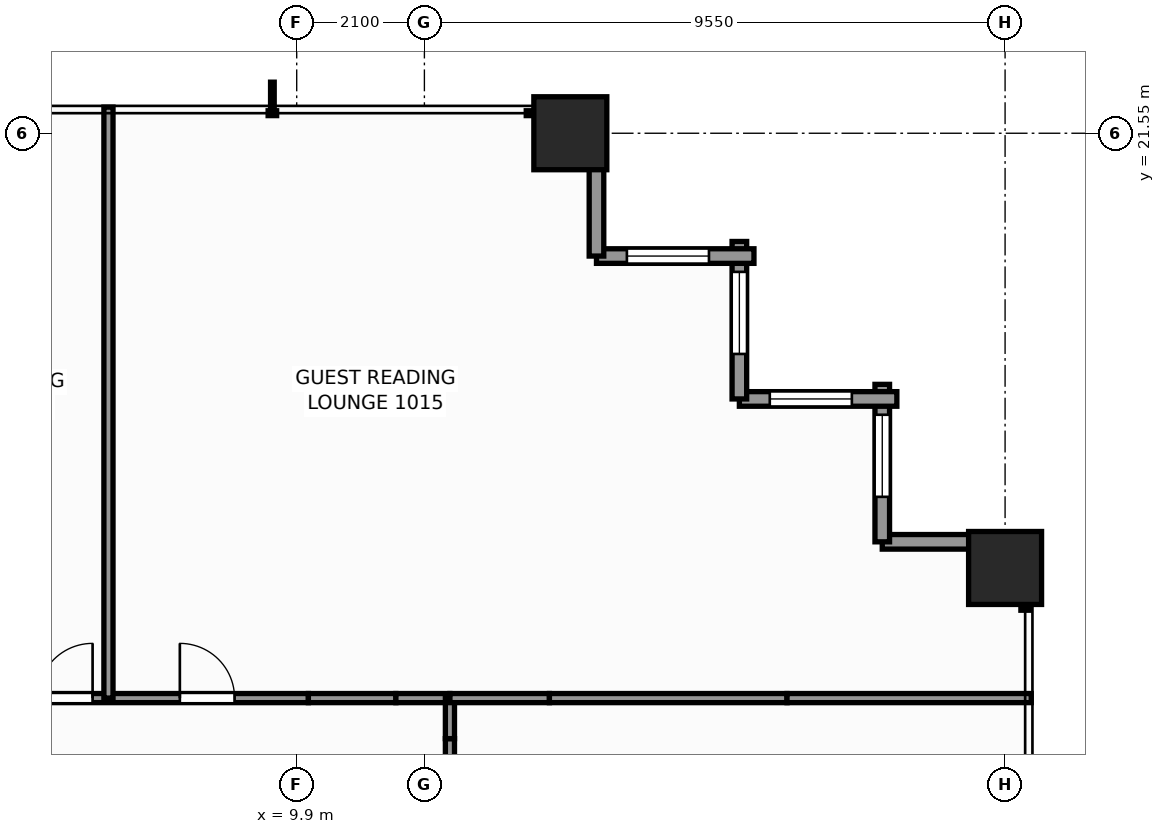
"""IFC4 building model, lengths in metres.
Left out: names, types, materials, properties, quantities, classifications, styles, units other than length and angle.
Written with IfcOpenShell. Run it as: python <this file> out.ifc"""

import sys

from ifc_helpers import new_model, si_unit, direction, frame, frame_2d, origin, origin_2d, place, context, subcontext, project, spatial, rectangle, extrude, element, fill, save


model = new_model("IFC4")
c1 = context("Model", 3, precision=1e-05, world=origin(), true_north=direction((0.0, 1.0)))
c2 = subcontext(c1, "Body", "Model", "MODEL_VIEW")
j1 = project(units=[si_unit("LENGTHUNIT", "METRE"), si_unit("PLANEANGLEUNIT", "RADIAN")], contexts=[c1])
p1 = place(None, origin())
s1 = spatial("IfcSite", under=j1, at=p1, CompositionType="ELEMENT")
p2 = place(p1, origin())
s2 = spatial("IfcBuilding", under=s1, at=p2, CompositionType="ELEMENT")
p3 = place(p2, frame((0.0, 0.0, 37.0)))
s3 = spatial("IfcBuildingStorey", under=s2, at=p3, CompositionType="ELEMENT", Elevation=37.0)
for number, where, z_axis, x_axis in (
    (1, (14.4, 21.55, 0.0), (0.0, 0.0, 1.0), (1.0, 0.0, 0.0)),
    (2, (21.55, 14.4, 0.0), (0.0, 0.0, 1.0), (1.0, 0.0, 0.0)),
):
    element("IfcColumn", number, at=place(p3, frame(where, z_axis=z_axis, x_axis=x_axis)), inside=s3, PredefinedType="COLUMN", context=c2, shape_type="SweptSolid", body=[
        extrude(rectangle(XDim=1.2, YDim=1.2, at=origin_2d()), origin(), (0.0, 0.0, 1.0), 3.3),
    ])
p4 = place(p3, frame((19.53, 14.83, 0.0), z_axis=(0.0, 0.0, 1.0), x_axis=(1.0, 0.0, 0.0)))
e3 = element("IfcWall", 3, at=p4, inside=s3, PredefinedType="STANDARD", context=c2, shape_type="SweptSolid", body=[
    extrude(rectangle(XDim=2.59, YDim=0.24, at=frame_2d((1.295, 0.0))), origin(), (0.0, 0.0, 1.0), 1.955),
])
p5 = place(p3, frame((19.53, 17.42, 0.0), z_axis=(0.0, 0.0, 1.0), x_axis=(0.0, -1.0, 0.0)))
e4 = element("IfcWall", 4, at=p5, inside=s3, PredefinedType="STANDARD", context=c2, shape_type="SweptSolid", body=[
    extrude(rectangle(XDim=2.59, YDim=0.24, at=frame_2d((1.295, 0.0))), origin(), (0.0, 0.0, 1.0), 2.439),
])
p6 = place(p5, frame((0.5, 0.0, 0.65)))
e5 = element("IfcOpeningElement", 5, at=p6, cuts=e4, PredefinedType="OPENING", context=c2, shape_type="SweptSolid", body=[
    extrude(rectangle(XDim=1.35, YDim=1.55, at=frame_2d((0.675, 0.775))), frame((0.0, 0.13, 0.0), z_axis=(0.0, -1.0, 0.0), x_axis=(1.0, 0.0, 0.0)), (0.0, 0.0, 1.0), 0.26),
])
p7 = place(p3, frame((17.18, 17.18, 0.0), z_axis=(0.0, 0.0, 1.0), x_axis=(1.0, 0.0, 0.0)))
e6 = element("IfcWall", 6, at=p7, inside=s3, PredefinedType="STANDARD", context=c2, shape_type="SweptSolid", body=[
    extrude(rectangle(XDim=2.59, YDim=0.24, at=frame_2d((1.295, 0.0))), origin(), (0.0, 0.0, 1.0), 2.439),
])
p8 = place(p7, frame((0.5, 0.0, 0.65)))
e7 = element("IfcOpeningElement", 7, at=p8, cuts=e6, PredefinedType="OPENING", context=c2, shape_type="SweptSolid", body=[
    extrude(rectangle(XDim=1.35, YDim=1.55, at=frame_2d((0.675, 0.775))), frame((0.0, 0.13, 0.0), z_axis=(0.0, -1.0, 0.0), x_axis=(1.0, 0.0, 0.0)), (0.0, 0.0, 1.0), 0.26),
])
p9 = place(p3, frame((17.18, 19.77, 0.0), z_axis=(0.0, 0.0, 1.0), x_axis=(0.0, -1.0, 0.0)))
e8 = element("IfcWall", 8, at=p9, inside=s3, PredefinedType="STANDARD", context=c2, shape_type="SweptSolid", body=[
    extrude(rectangle(XDim=2.59, YDim=0.24, at=frame_2d((1.295, 0.0))), origin(), (0.0, 0.0, 1.0), 2.439),
])
p10 = place(p9, frame((0.5, 0.0, 0.65)))
e9 = element("IfcOpeningElement", 9, at=p10, cuts=e8, PredefinedType="OPENING", context=c2, shape_type="SweptSolid", body=[
    extrude(rectangle(XDim=1.35, YDim=1.55, at=frame_2d((0.675, 0.775))), frame((0.0, 0.13, 0.0), z_axis=(0.0, -1.0, 0.0), x_axis=(1.0, 0.0, 0.0)), (0.0, 0.0, 1.0), 0.26),
])
p11 = place(p3, frame((14.83, 19.53, 0.0), z_axis=(0.0, 0.0, 1.0), x_axis=(1.0, 0.0, 0.0)))
e10 = element("IfcWall", 10, at=p11, inside=s3, PredefinedType="STANDARD", context=c2, shape_type="SweptSolid", body=[
    extrude(rectangle(XDim=2.59, YDim=0.24, at=frame_2d((1.295, 0.0))), origin(), (0.0, 0.0, 1.0), 2.439),
])
p12 = place(p11, frame((0.5, 0.0, 0.65)))
e11 = element("IfcOpeningElement", 11, at=p12, cuts=e10, PredefinedType="OPENING", context=c2, shape_type="SweptSolid", body=[
    extrude(rectangle(XDim=1.35, YDim=1.55, at=frame_2d((0.675, 0.775))), frame((0.0, 0.13, 0.0), z_axis=(0.0, -1.0, 0.0), x_axis=(1.0, 0.0, 0.0)), (0.0, 0.0, 1.0), 0.26),
])
p13 = place(p3, frame((14.83, 22.12, 0.0), z_axis=(0.0, 0.0, 1.0), x_axis=(0.0, -1.0, 0.0)))
e12 = element("IfcWall", 12, at=p13, inside=s3, PredefinedType="STANDARD", context=c2, shape_type="SweptSolid", body=[
    extrude(rectangle(XDim=2.59, YDim=0.24, at=frame_2d((1.295, 0.0))), origin(), (0.0, 0.0, 1.0), 1.955),
])
p14 = place(p3, frame((5.242, 12.26, 0.0), z_axis=(0.0, 0.0, 1.0), x_axis=(1.0, 0.0, 0.0)))
e13 = element("IfcWall", 13, at=p14, inside=s3, PredefinedType="PARTITIONING", context=c2, shape_type="SweptSolid", body=[
    extrude(rectangle(XDim=4.85, YDim=0.15, at=frame_2d((2.425, 0.0))), origin(), (0.0, 0.0, 1.0), 3.06),
])
p15 = place(p14, frame((0.401, 0.0, 0.0)))
e14 = element("IfcOpeningElement", 14, at=p15, cuts=e13, PredefinedType="OPENING", context=c2, shape_type="SweptSolid", body=[
    extrude(rectangle(XDim=0.9, YDim=2.06, at=frame_2d((0.45, 1.03))), frame((0.0, 0.085, 0.0), z_axis=(0.0, -1.0, 0.0), x_axis=(1.0, 0.0, 0.0)), (0.0, 0.0, 1.0), 0.17),
])
p16 = place(p14, frame((2.736, 0.0, 0.0)))
e15 = element("IfcOpeningElement", 15, at=p16, cuts=e13, PredefinedType="OPENING", context=c2, shape_type="SweptSolid", body=[
    extrude(rectangle(XDim=0.9, YDim=2.06, at=frame_2d((0.45, 1.03))), frame((0.0, 0.085, 0.0), z_axis=(0.0, -1.0, 0.0), x_axis=(1.0, 0.0, 0.0)), (0.0, 0.0, 1.0), 0.17),
])
p17 = place(p3, frame((10.092, 12.26, 0.0), z_axis=(0.0, 0.0, 1.0), x_axis=(1.0, 0.0, 0.0)))
e16 = element("IfcWall", 16, at=p17, inside=s3, PredefinedType="PARTITIONING", context=c2, shape_type="SweptSolid", body=[
    extrude(rectangle(XDim=1.439, YDim=0.15, at=frame_2d((0.72, 0.0))), origin(), (0.0, 0.0, 1.0), 1.945),
])
p18 = place(p3, frame((11.531, 12.26, 0.0), z_axis=(0.0, 0.0, 1.0), x_axis=(1.0, 0.0, 0.0)))
e17 = element("IfcWall", 17, at=p18, inside=s3, PredefinedType="PARTITIONING", context=c2, shape_type="SweptSolid", body=[
    extrude(rectangle(XDim=0.889, YDim=0.15, at=frame_2d((0.444, 0.0))), origin(), (0.0, 0.0, 1.0), 3.06),
])
p19 = place(p3, frame((12.42, 10.154, 0.0), z_axis=(0.0, 0.0, 1.0), x_axis=(0.0, 1.0, 0.0)))
e18 = element("IfcWall", 18, at=p19, inside=s3, PredefinedType="PARTITIONING", context=c2, shape_type="SweptSolid", body=[
    extrude(rectangle(XDim=1.439, YDim=0.15, at=frame_2d((0.72, 0.0))), origin(), (0.0, 0.0, 1.0), 1.945),
])
p20 = place(p3, frame((12.42, 11.593, 0.0), z_axis=(0.0, 0.0, 1.0), x_axis=(0.0, 1.0, 0.0)))
e19 = element("IfcWall", 19, at=p20, inside=s3, PredefinedType="PARTITIONING", context=c2, shape_type="SweptSolid", body=[
    extrude(rectangle(XDim=0.667, YDim=0.15, at=frame_2d((0.333, 0.0))), origin(), (0.0, 0.0, 1.0), 3.06),
])
p21 = place(p3, frame((12.42, 12.26, 0.0), z_axis=(0.0, 0.0, 1.0), x_axis=(1.0, 0.0, 0.0)))
e20 = element("IfcWall", 20, at=p21, inside=s3, PredefinedType="PARTITIONING", context=c2, shape_type="SweptSolid", body=[
    extrude(rectangle(XDim=1.636, YDim=0.15, at=frame_2d((0.818, 0.0))), origin(), (0.0, 0.0, 1.0), 3.06),
])
p22 = place(p3, frame((14.056, 12.26, 0.0), z_axis=(0.0, 0.0, 1.0), x_axis=(1.0, 0.0, 0.0)))
e21 = element("IfcWall", 21, at=p22, inside=s3, PredefinedType="PARTITIONING", context=c2, shape_type="SweptSolid", body=[
    extrude(rectangle(XDim=3.907, YDim=0.15, at=frame_2d((1.954, 0.0))), origin(), (0.0, 0.0, 1.0), 1.945),
])
p23 = place(p3, frame((17.963, 12.26, 0.0), z_axis=(0.0, 0.0, 1.0), x_axis=(1.0, 0.0, 0.0)))
e22 = element("IfcWall", 22, at=p23, inside=s3, PredefinedType="PARTITIONING", context=c2, shape_type="SweptSolid", body=[
    extrude(rectangle(XDim=4.017, YDim=0.15, at=frame_2d((2.008, 0.0))), origin(), (0.0, 0.0, 1.0), 2.429),
])
p24 = place(p3, frame((6.804, 12.26, 0.0), z_axis=(0.0, 0.0, 1.0), x_axis=(0.0, 1.0, 0.0)))
e23 = element("IfcWall", 23, at=p24, inside=s3, PredefinedType="PARTITIONING", context=c2, shape_type="SweptSolid", body=[
    extrude(rectangle(XDim=9.72, YDim=0.15, at=frame_2d((4.86, 0.0))), origin(), (0.0, 0.0, 1.0), 2.429),
])
p25 = place(p6, origin())
e24 = element("IfcWindow", 24, at=p25, inside=s3, PartitioningType="SINGLE_PANEL", PredefinedType="WINDOW", context=c2, shape_type="SweptSolid", body=[
    extrude(rectangle(XDim=1.35, YDim=1.55, at=frame_2d((0.675, 0.775))), frame((0.0, 0.03, 0.0), z_axis=(0.0, -1.0, 0.0), x_axis=(1.0, 0.0, 0.0)), (0.0, 0.0, 1.0), 0.06),
])
fill(e5, e24)
p26 = place(p8, origin())
e25 = element("IfcWindow", 25, at=p26, inside=s3, PartitioningType="SINGLE_PANEL", PredefinedType="WINDOW", context=c2, shape_type="SweptSolid", body=[
    extrude(rectangle(XDim=1.35, YDim=1.55, at=frame_2d((0.675, 0.775))), frame((0.0, 0.03, 0.0), z_axis=(0.0, -1.0, 0.0), x_axis=(1.0, 0.0, 0.0)), (0.0, 0.0, 1.0), 0.06),
])
fill(e7, e25)
p27 = place(p10, origin())
e26 = element("IfcWindow", 26, at=p27, inside=s3, PartitioningType="SINGLE_PANEL", PredefinedType="WINDOW", context=c2, shape_type="SweptSolid", body=[
    extrude(rectangle(XDim=1.35, YDim=1.55, at=frame_2d((0.675, 0.775))), frame((0.0, 0.03, 0.0), z_axis=(0.0, -1.0, 0.0), x_axis=(1.0, 0.0, 0.0)), (0.0, 0.0, 1.0), 0.06),
])
fill(e9, e26)
p28 = place(p12, origin())
e27 = element("IfcWindow", 27, at=p28, inside=s3, PartitioningType="SINGLE_PANEL", PredefinedType="WINDOW", context=c2, shape_type="SweptSolid", body=[
    extrude(rectangle(XDim=1.35, YDim=1.55, at=frame_2d((0.675, 0.775))), frame((0.0, 0.03, 0.0), z_axis=(0.0, -1.0, 0.0), x_axis=(1.0, 0.0, 0.0)), (0.0, 0.0, 1.0), 0.06),
])
fill(e11, e27)
p29 = place(p15, origin())
e28 = element("IfcDoor", 28, at=p29, inside=s3, OperationType="SINGLE_SWING_RIGHT", PredefinedType="DOOR", context=c2, shape_type="SweptSolid", body=[
    extrude(rectangle(XDim=0.9, YDim=2.06, at=frame_2d((0.45, 1.03))), frame((0.0, 0.025, 0.0), z_axis=(0.0, -1.0, 0.0), x_axis=(1.0, 0.0, 0.0)), (0.0, 0.0, 1.0), 0.05),
])
fill(e14, e28)
p30 = place(p16, origin())
e29 = element("IfcDoor", 29, at=p30, inside=s3, OperationType="SINGLE_SWING_LEFT", PredefinedType="DOOR", context=c2, shape_type="SweptSolid", body=[
    extrude(rectangle(XDim=0.9, YDim=2.06, at=frame_2d((0.45, 1.03))), frame((0.0, 0.025, 0.0), z_axis=(0.0, -1.0, 0.0), x_axis=(1.0, 0.0, 0.0)), (0.0, 0.0, 1.0), 0.05),
])
fill(e15, e29)
save(model, sys.argv[1])
